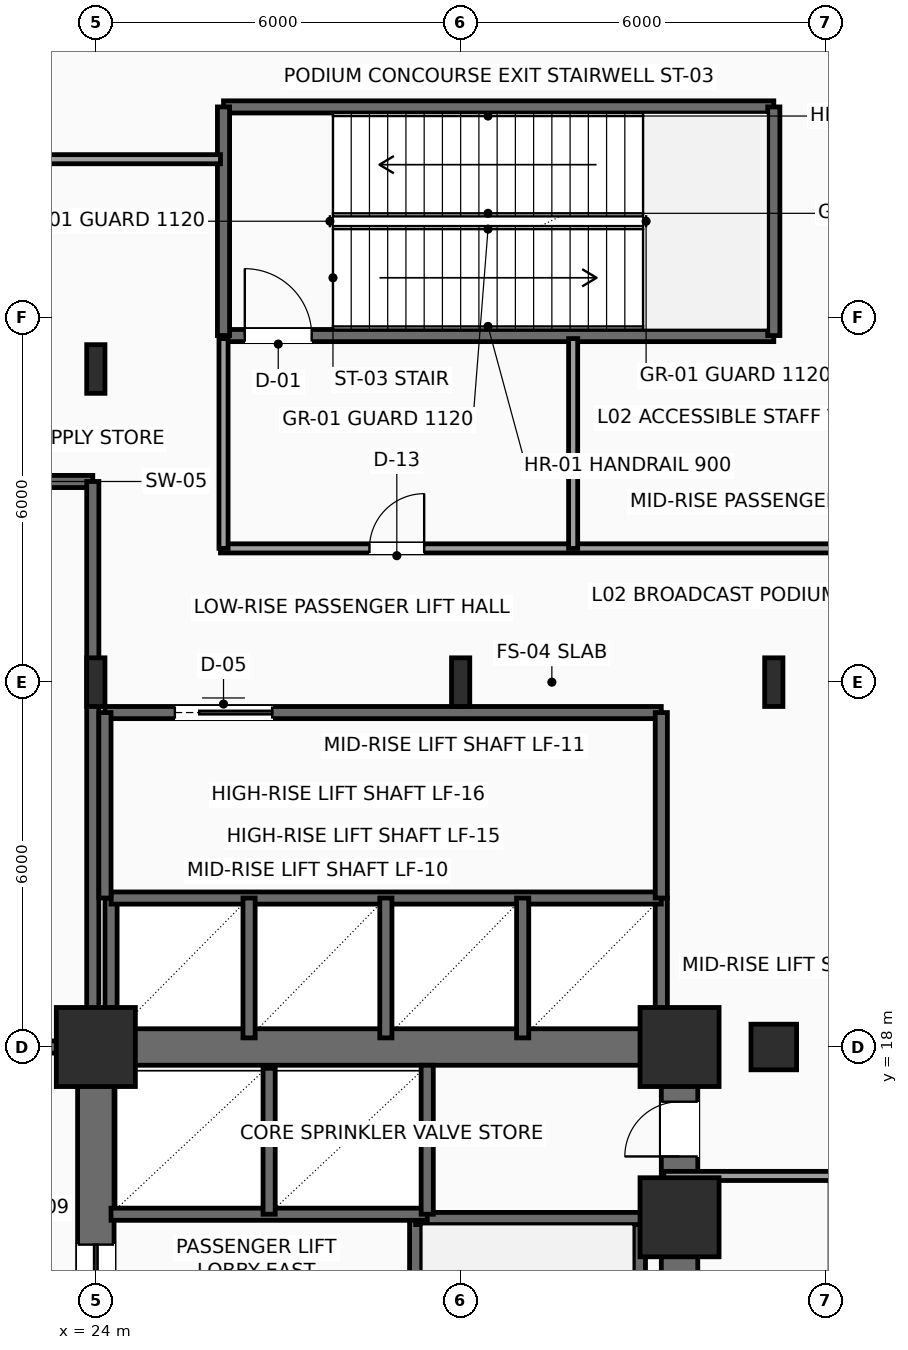
"""IFC4 building model, lengths in metres.
Left out: names, types, materials, properties, quantities, classifications, styles, units other than length and angle.
Written with IfcOpenShell. Run it as: python <this file> out.ifc"""

import sys

from ifc_helpers import new_model, si_unit, direction, frame, frame_2d, origin, origin_2d, place, context, subcontext, project, spatial, rectangle, hollow_rectangle, i_section, extrude, element, fill, save


model = new_model("IFC4")
c1 = context("Model", 3, precision=1e-05, world=origin(), true_north=direction((0.0, 1.0)))
c2 = subcontext(c1, "Body", "Model", "MODEL_VIEW")
j1 = project(units=[si_unit("LENGTHUNIT", "METRE"), si_unit("PLANEANGLEUNIT", "RADIAN")], contexts=[c1])
p1 = place(None, origin())
s1 = spatial("IfcSite", under=j1, at=p1, CompositionType="ELEMENT")
p2 = place(p1, origin())
s2 = spatial("IfcBuilding", under=s1, at=p2, CompositionType="ELEMENT")
p3 = place(p2, frame((0.0, 0.0, 11.1)))
s3 = spatial("IfcBuildingStorey", under=s2, at=p3, CompositionType="ELEMENT", Elevation=11.1)
for number, where, z_axis, x_axis in (
    (1, (24.0, 18.0, 0.0), (0.0, 0.0, 1.0), (1.0, 0.0, 0.0)),
    (2, (33.6, 15.2, 0.0), (0.0, 0.0, 1.0), (1.0, 0.0, 0.0)),
    (3, (33.6, 18.0, 0.0), (0.0, 0.0, 1.0), (1.0, 0.0, 0.0)),
):
    element("IfcColumn", number, at=place(p3, frame(where, z_axis=z_axis, x_axis=x_axis)), inside=s3, PredefinedType="COLUMN", context=c2, shape_type="SweptSolid", body=[
        extrude(rectangle(XDim=1.3, YDim=1.3, at=origin_2d()), origin(), (0.0, 0.0, 1.0), 5.4),
    ])
for number, where, z_axis, x_axis in (
    (4, (24.0, 24.0, 0.0), (0.0, 0.0, 1.0), (1.0, 0.0, 0.0)),
    (5, (24.0, 29.15, 0.0), (0.0, 0.0, 1.0), (1.0, 0.0, 0.0)),
    (6, (30.0, 24.0, 0.0), (0.0, 0.0, 1.0), (1.0, 0.0, 0.0)),
):
    element("IfcColumn", number, at=place(p3, frame(where, z_axis=z_axis, x_axis=x_axis)), inside=s3, PredefinedType="COLUMN", context=c2, shape_type="SweptSolid", body=[
        extrude(i_section(OverallWidth=0.3, OverallDepth=0.8, WebThickness=0.018, FlangeThickness=0.033, FilletRadius=0.03, at=origin_2d()), origin(), (0.0, 0.0, 1.0), 5.4),
    ])
p4 = place(p3, frame((35.15, 18.0, 0.0), z_axis=(0.0, 0.0, 1.0), x_axis=(1.0, 0.0, 0.0)))
e7 = element("IfcColumn", 7, at=p4, inside=s3, PredefinedType="COLUMN", context=c2, shape_type="SweptSolid", body=[
    extrude(hollow_rectangle(XDim=0.75, YDim=0.75, WallThickness=0.035, InnerFilletRadius=0.035, OuterFilletRadius=0.05, at=origin_2d()), origin(), (0.0, 0.0, 1.0), 5.4),
])
p5 = place(p3, frame((35.15, 24.0, 0.0), z_axis=(0.0, 0.0, 1.0), x_axis=(1.0, 0.0, 0.0)))
e8 = element("IfcColumn", 8, at=p5, inside=s3, PredefinedType="COLUMN", context=c2, shape_type="SweptSolid", body=[
    extrude(i_section(OverallWidth=0.3, OverallDepth=0.8, WebThickness=0.018, FlangeThickness=0.033, FilletRadius=0.03, at=origin_2d()), origin(), (0.0, 0.0, 1.0), 5.4),
])
p6 = place(p3, frame((24.0, 18.0, 0.0), z_axis=(0.0, 0.0, 1.0), x_axis=(1.0, 0.0, 0.0)))
e9 = element("IfcWall", 9, at=p6, inside=s3, PredefinedType="SHEAR", context=c2, shape_type="SweptSolid", body=[
    extrude(rectangle(XDim=9.6, YDim=0.6, at=frame_2d((4.8, 0.0))), origin(), (0.0, 0.0, 1.0), 5.1),
])
p7 = place(p3, frame((24.0, 6.0, 0.0), z_axis=(0.0, 0.0, 1.0), x_axis=(0.0, 1.0, 0.0)))
e10 = element("IfcWall", 10, at=p7, inside=s3, PredefinedType="SHEAR", context=c2, shape_type="SweptSolid", body=[
    extrude(rectangle(XDim=12.0, YDim=0.6, at=frame_2d((6.0, 0.0))), origin(), (0.0, 0.0, 1.0), 5.1),
])
p8 = place(p7, frame((7.15, 0.0, 0.0)))
e11 = element("IfcOpeningElement", 11, at=p8, cuts=e10, PredefinedType="OPENING", context=c2, shape_type="SweptSolid", body=[
    extrude(rectangle(XDim=1.6, YDim=2.3, at=frame_2d((0.8, 1.15))), frame((0.0, 0.31, 0.0), z_axis=(0.0, -1.0, 0.0), x_axis=(1.0, 0.0, 0.0)), (0.0, 0.0, 1.0), 0.62),
])
p9 = place(p3, frame((33.6, 6.0, 0.0), z_axis=(0.0, 0.0, 1.0), x_axis=(0.0, 1.0, 0.0)))
e12 = element("IfcWall", 12, at=p9, inside=s3, PredefinedType="SHEAR", context=c2, shape_type="SweptSolid", body=[
    extrude(rectangle(XDim=12.0, YDim=0.6, at=frame_2d((6.0, 0.0))), origin(), (0.0, 0.0, 1.0), 5.1),
])
p10 = place(p9, frame((10.2, 0.0, 0.0)))
e13 = element("IfcOpeningElement", 13, at=p10, cuts=e12, PredefinedType="OPENING", context=c2, shape_type="SweptSolid", body=[
    extrude(rectangle(XDim=0.9, YDim=2.15, at=frame_2d((0.45, 1.075))), frame((0.0, 0.31, 0.0), z_axis=(0.0, -1.0, 0.0), x_axis=(1.0, 0.0, 0.0)), (0.0, 0.0, 1.0), 0.62),
])
p11 = place(p3, frame((29.26, 6.3, 0.0), z_axis=(0.0, 0.0, 1.0), x_axis=(0.0, 1.0, 0.0)))
e14 = element("IfcWall", 14, at=p11, inside=s3, PredefinedType="SHEAR", context=c2, shape_type="SweptSolid", body=[
    extrude(rectangle(XDim=8.88, YDim=0.2, at=frame_2d((4.44, 0.0))), origin(), (0.0, 0.0, 1.0), 5.1),
])
p12 = place(p11, frame((0.35, 0.0, 0.0)))
e15 = element("IfcOpeningElement", 15, at=p12, cuts=e14, PredefinedType="OPENING", context=c2, shape_type="SweptSolid", body=[
    extrude(rectangle(XDim=1.1, YDim=2.2, at=frame_2d((0.55, 1.1))), frame((0.0, 0.11, 0.0), z_axis=(0.0, -1.0, 0.0), x_axis=(1.0, 0.0, 0.0)), (0.0, 0.0, 1.0), 0.22),
])
p13 = place(p3, frame((32.94, 6.3, 0.0), z_axis=(0.0, 0.0, 1.0), x_axis=(0.0, 1.0, 0.0)))
e16 = element("IfcWall", 16, at=p13, inside=s3, PredefinedType="SHEAR", context=c2, shape_type="SweptSolid", body=[
    extrude(rectangle(XDim=8.88, YDim=0.2, at=frame_2d((4.44, 0.0))), origin(), (0.0, 0.0, 1.0), 5.1),
])
p14 = place(p3, frame((29.26, 15.18, 0.0), z_axis=(0.0, 0.0, 1.0), x_axis=(1.0, 0.0, 0.0)))
e17 = element("IfcWall", 17, at=p14, inside=s3, PredefinedType="SHEAR", context=c2, shape_type="SweptSolid", body=[
    extrude(rectangle(XDim=4.04, YDim=0.2, at=frame_2d((2.02, 0.0))), origin(), (0.0, 0.0, 1.0), 5.1),
])
p15 = place(p3, frame((24.25, 15.25, 0.0), z_axis=(0.0, 0.0, 1.0), x_axis=(1.0, 0.0, 0.0)))
e18 = element("IfcWall", 18, at=p15, inside=s3, PredefinedType="SHEAR", context=c2, shape_type="SweptSolid", body=[
    extrude(rectangle(XDim=5.2, YDim=0.2, at=frame_2d((2.6, 0.0))), origin(), (0.0, 0.0, 1.0), 5.1),
])
p16 = place(p3, frame((26.85, 15.25, 0.0), z_axis=(0.0, 0.0, 1.0), x_axis=(0.0, 1.0, 0.0)))
e19 = element("IfcWall", 19, at=p16, inside=s3, PredefinedType="SHEAR", context=c2, shape_type="SweptSolid", body=[
    extrude(rectangle(XDim=2.4, YDim=0.2, at=frame_2d((1.2, 0.0))), origin(), (0.0, 0.0, 1.0), 5.1),
])
p17 = place(p3, frame((29.45, 15.25, 0.0), z_axis=(0.0, 0.0, 1.0), x_axis=(0.0, 1.0, 0.0)))
e20 = element("IfcWall", 20, at=p17, inside=s3, PredefinedType="SHEAR", context=c2, shape_type="SweptSolid", body=[
    extrude(rectangle(XDim=2.45, YDim=0.2, at=frame_2d((1.225, 0.0))), origin(), (0.0, 0.0, 1.0), 5.1),
])
p18 = place(p3, frame((20.45, 18.0, 0.0), z_axis=(0.0, 0.0, 1.0), x_axis=(1.0, 0.0, 0.0)))
e21 = element("IfcWall", 21, at=p18, inside=s3, PredefinedType="SHEAR", context=c2, shape_type="SweptSolid", body=[
    extrude(rectangle(XDim=3.5, YDim=0.2, at=frame_2d((1.75, 0.0))), origin(), (0.0, 0.0, 1.0), 5.1),
])
p19 = place(p18, frame((0.95, 0.0, 0.0)))
e22 = element("IfcOpeningElement", 22, at=p19, cuts=e21, PredefinedType="OPENING", context=c2, shape_type="SweptSolid", body=[
    extrude(rectangle(XDim=1.6, YDim=2.3, at=frame_2d((0.8, 1.15))), frame((0.0, 0.11, 0.0), z_axis=(0.0, -1.0, 0.0), x_axis=(1.0, 0.0, 0.0)), (0.0, 0.0, 1.0), 0.22),
])
p20 = place(p3, frame((20.45, 27.3, 0.0), z_axis=(0.0, 0.0, 1.0), x_axis=(1.0, 0.0, 0.0)))
e23 = element("IfcWall", 23, at=p20, inside=s3, PredefinedType="SHEAR", context=c2, shape_type="SweptSolid", body=[
    extrude(rectangle(XDim=3.5, YDim=0.2, at=frame_2d((1.75, 0.0))), origin(), (0.0, 0.0, 1.0), 5.1),
])
p21 = place(p3, frame((23.95, 18.0, 0.0), z_axis=(0.0, 0.0, 1.0), x_axis=(0.0, 1.0, 0.0)))
e24 = element("IfcWall", 24, at=p21, inside=s3, PredefinedType="SHEAR", context=c2, shape_type="SweptSolid", body=[
    extrude(rectangle(XDim=9.3, YDim=0.2, at=frame_2d((4.65, 0.0))), origin(), (0.0, 0.0, 1.0), 5.1),
])
for number, where, z_axis, x_axis in (
    (25, (33.3, 18.1, 0.0), (0.0, 0.0, 1.0), (0.0, 1.0, 0.0)),
    (26, (24.25, 18.1, 0.0), (0.0, 0.0, 1.0), (0.0, 1.0, 0.0)),
):
    element("IfcWall", number, at=place(p3, frame(where, z_axis=z_axis, x_axis=x_axis)), inside=s3, PredefinedType="SHEAR", context=c2, shape_type="SweptSolid", body=[
        extrude(rectangle(XDim=2.35, YDim=0.2, at=frame_2d((1.175, 0.0))), origin(), (0.0, 0.0, 1.0), 5.1),
    ])
p22 = place(p3, frame((24.25, 20.45, 0.0), z_axis=(0.0, 0.0, 1.0), x_axis=(1.0, 0.0, 0.0)))
e27 = element("IfcWall", 27, at=p22, inside=s3, PredefinedType="SHEAR", context=c2, shape_type="SweptSolid", body=[
    extrude(rectangle(XDim=9.05, YDim=0.2, at=frame_2d((4.525, 0.0))), origin(), (0.0, 0.0, 1.0), 5.1),
])
for number, where, z_axis, x_axis in (
    (28, (26.52, 18.15, 0.0), (0.0, 0.0, 1.0), (0.0, 1.0, 0.0)),
    (29, (28.77, 18.15, 0.0), (0.0, 0.0, 1.0), (0.0, 1.0, 0.0)),
    (30, (31.02, 18.15, 0.0), (0.0, 0.0, 1.0), (0.0, 1.0, 0.0)),
):
    element("IfcWall", number, at=place(p3, frame(where, z_axis=z_axis, x_axis=x_axis)), inside=s3, PredefinedType="SHEAR", context=c2, shape_type="SweptSolid", body=[
        extrude(rectangle(XDim=2.3, YDim=0.2, at=frame_2d((1.15, 0.0))), origin(), (0.0, 0.0, 1.0), 5.1),
    ])
p23 = place(p3, frame((24.15, 23.5, 0.0), z_axis=(0.0, 0.0, 1.0), x_axis=(1.0, 0.0, 0.0)))
e31 = element("IfcWall", 31, at=p23, inside=s3, PredefinedType="SHEAR", context=c2, shape_type="SweptSolid", body=[
    extrude(rectangle(XDim=9.15, YDim=0.2, at=frame_2d((4.575, 0.0))), origin(), (0.0, 0.0, 1.0), 5.1),
])
p24 = place(p23, frame((1.15, 0.0, 0.0)))
e32 = element("IfcOpeningElement", 32, at=p24, cuts=e31, PredefinedType="OPENING", context=c2, shape_type="SweptSolid", body=[
    extrude(rectangle(XDim=1.6, YDim=2.3, at=frame_2d((0.8, 1.15))), frame((0.0, 0.11, 0.0), z_axis=(0.0, -1.0, 0.0), x_axis=(1.0, 0.0, 0.0)), (0.0, 0.0, 1.0), 0.22),
])
for number, where, z_axis, x_axis in (
    (33, (33.3, 20.45, 0.0), (0.0, 0.0, 1.0), (0.0, 1.0, 0.0)),
    (34, (24.15, 20.45, 0.0), (0.0, 0.0, 1.0), (0.0, 1.0, 0.0)),
):
    element("IfcWall", number, at=place(p3, frame(where, z_axis=z_axis, x_axis=x_axis)), inside=s3, PredefinedType="SHEAR", context=c2, shape_type="SweptSolid", body=[
        extrude(rectangle(XDim=3.05, YDim=0.2, at=frame_2d((1.525, 0.0))), origin(), (0.0, 0.0, 1.0), 5.1),
    ])
p25 = place(p3, frame((26.1, 29.7, 0.0), z_axis=(0.0, 0.0, 1.0), x_axis=(1.0, 0.0, 0.0)))
e35 = element("IfcWall", 35, at=p25, inside=s3, PredefinedType="SHEAR", context=c2, shape_type="SweptSolid", body=[
    extrude(rectangle(XDim=9.05, YDim=0.2, at=frame_2d((4.525, 0.0))), origin(), (0.0, 0.0, 1.0), 5.1),
])
p26 = place(p25, frame((0.35, 0.0, 0.0)))
e36 = element("IfcOpeningElement", 36, at=p26, cuts=e35, PredefinedType="OPENING", context=c2, shape_type="SweptSolid", body=[
    extrude(rectangle(XDim=1.1, YDim=2.2, at=frame_2d((0.55, 1.1))), frame((0.0, 0.11, 0.0), z_axis=(0.0, -1.0, 0.0), x_axis=(1.0, 0.0, 0.0)), (0.0, 0.0, 1.0), 0.22),
])
p27 = place(p3, frame((26.1, 33.46, 0.0), z_axis=(0.0, 0.0, 1.0), x_axis=(1.0, 0.0, 0.0)))
e37 = element("IfcWall", 37, at=p27, inside=s3, PredefinedType="SHEAR", context=c2, shape_type="SweptSolid", body=[
    extrude(rectangle(XDim=9.05, YDim=0.2, at=frame_2d((4.525, 0.0))), origin(), (0.0, 0.0, 1.0), 5.1),
])
for number, where, z_axis, x_axis in (
    (38, (26.1, 29.7, 0.0), (0.0, 0.0, 1.0), (0.0, 1.0, 0.0)),
    (39, (35.15, 29.7, 0.0), (0.0, 0.0, 1.0), (0.0, 1.0, 0.0)),
):
    element("IfcWall", number, at=place(p3, frame(where, z_axis=z_axis, x_axis=x_axis)), inside=s3, PredefinedType="SHEAR", context=c2, shape_type="SweptSolid", body=[
        extrude(rectangle(XDim=3.76, YDim=0.2, at=frame_2d((1.88, 0.0))), origin(), (0.0, 0.0, 1.0), 5.1),
    ])
p28 = place(p3, frame((36.15, 15.88, 0.0), z_axis=(0.0, 0.0, 1.0), x_axis=(-1.0, 0.0, 0.0)))
e40 = element("IfcWall", 40, at=p28, inside=s3, PredefinedType="PARTITIONING", context=c2, shape_type="SweptSolid", body=[
    extrude(rectangle(XDim=2.81, YDim=0.15, at=frame_2d((1.405, 0.0))), origin(), (0.0, 0.0, 1.0), 5.1),
])
p29 = place(p3, frame((20.5, 32.6, 0.0), z_axis=(0.0, 0.0, 1.0), x_axis=(1.0, 0.0, 0.0)))
e41 = element("IfcWall", 41, at=p29, inside=s3, PredefinedType="PARTITIONING", context=c2, shape_type="SweptSolid", body=[
    extrude(rectangle(XDim=5.55, YDim=0.15, at=frame_2d((2.775, 0.0))), origin(), (0.0, 0.0, 1.0), 5.1),
])
p30 = place(p3, frame((26.05, 26.2, 0.0), z_axis=(0.0, 0.0, 1.0), x_axis=(1.0, 0.0, 0.0)))
e42 = element("IfcWall", 42, at=p30, inside=s3, PredefinedType="PARTITIONING", context=c2, shape_type="SweptSolid", body=[
    extrude(rectangle(XDim=33.55, YDim=0.15, at=frame_2d((16.775, 0.0))), origin(), (0.0, 0.0, 1.0), 5.1),
])
p31 = place(p30, frame((2.45, 0.0, 0.0)))
e43 = element("IfcOpeningElement", 43, at=p31, cuts=e42, PredefinedType="OPENING", context=c2, shape_type="SweptSolid", body=[
    extrude(rectangle(XDim=0.9, YDim=2.1, at=frame_2d((0.45, 1.05))), frame((0.0, 0.085, 0.0), z_axis=(0.0, -1.0, 0.0), x_axis=(1.0, 0.0, 0.0)), (0.0, 0.0, 1.0), 0.17),
])
p32 = place(p30, frame((12.1, 0.0, 0.0)))
e44 = element("IfcOpeningElement", 44, at=p32, cuts=e42, PredefinedType="OPENING", context=c2, shape_type="SweptSolid", body=[
    extrude(rectangle(XDim=0.95, YDim=2.15, at=frame_2d((0.475, 1.075))), frame((0.0, 0.085, 0.0), z_axis=(0.0, -1.0, 0.0), x_axis=(1.0, 0.0, 0.0)), (0.0, 0.0, 1.0), 0.17),
])
p33 = place(p30, frame((19.575, 0.0, 0.0)))
e45 = element("IfcOpeningElement", 45, at=p33, cuts=e42, PredefinedType="OPENING", context=c2, shape_type="SweptSolid", body=[
    extrude(rectangle(XDim=0.95, YDim=2.15, at=frame_2d((0.475, 1.075))), frame((0.0, 0.085, 0.0), z_axis=(0.0, -1.0, 0.0), x_axis=(1.0, 0.0, 0.0)), (0.0, 0.0, 1.0), 0.17),
])
p34 = place(p30, frame((26.475, 0.0, 0.0)))
e46 = element("IfcOpeningElement", 46, at=p34, cuts=e42, PredefinedType="OPENING", context=c2, shape_type="SweptSolid", body=[
    extrude(rectangle(XDim=0.95, YDim=2.15, at=frame_2d((0.475, 1.075))), frame((0.0, 0.085, 0.0), z_axis=(0.0, -1.0, 0.0), x_axis=(1.0, 0.0, 0.0)), (0.0, 0.0, 1.0), 0.17),
])
p35 = place(p30, frame((31.175, 0.0, 0.0)))
e47 = element("IfcOpeningElement", 47, at=p35, cuts=e42, PredefinedType="OPENING", context=c2, shape_type="SweptSolid", body=[
    extrude(rectangle(XDim=0.95, YDim=2.15, at=frame_2d((0.475, 1.075))), frame((0.0, 0.085, 0.0), z_axis=(0.0, -1.0, 0.0), x_axis=(1.0, 0.0, 0.0)), (0.0, 0.0, 1.0), 0.17),
])
for number, where, z_axis, x_axis in (
    (48, (26.1, 26.2, 0.0), (0.0, 0.0, 1.0), (0.0, 1.0, 0.0)),
    (49, (31.85, 26.2, 0.0), (0.0, 0.0, 1.0), (0.0, 1.0, 0.0)),
):
    element("IfcWall", number, at=place(p3, frame(where, z_axis=z_axis, x_axis=x_axis)), inside=s3, PredefinedType="PARTITIONING", context=c2, shape_type="SweptSolid", body=[
        extrude(rectangle(XDim=3.45, YDim=0.15, at=frame_2d((1.725, 0.0))), origin(), (0.0, 0.0, 1.0), 5.1),
    ])
p36 = place(p8, origin())
e50 = element("IfcDoor", 50, at=p36, inside=s3, OperationType="DOUBLE_DOOR_SLIDING", PredefinedType="DOOR", context=c2, shape_type="SweptSolid", body=[
    extrude(rectangle(XDim=1.6, YDim=2.3, at=frame_2d((0.8, 1.15))), frame((0.0, 0.025, 0.0), z_axis=(0.0, -1.0, 0.0), x_axis=(1.0, 0.0, 0.0)), (0.0, 0.0, 1.0), 0.05),
])
fill(e11, e50)
p37 = place(p10, origin())
e51 = element("IfcDoor", 51, at=p37, inside=s3, OperationType="SINGLE_SWING_LEFT", PredefinedType="DOOR", context=c2, shape_type="SweptSolid", body=[
    extrude(rectangle(XDim=0.9, YDim=2.15, at=frame_2d((0.45, 1.075))), frame((0.0, 0.025, 0.0), z_axis=(0.0, -1.0, 0.0), x_axis=(1.0, 0.0, 0.0)), (0.0, 0.0, 1.0), 0.05),
])
fill(e13, e51)
p38 = place(p24, origin())
e52 = element("IfcDoor", 52, at=p38, inside=s3, OperationType="DOUBLE_DOOR_SLIDING", PredefinedType="DOOR", context=c2, shape_type="SweptSolid", body=[
    extrude(rectangle(XDim=1.6, YDim=2.3, at=frame_2d((0.8, 1.15))), frame((0.0, 0.025, 0.0), z_axis=(0.0, -1.0, 0.0), x_axis=(1.0, 0.0, 0.0)), (0.0, 0.0, 1.0), 0.05),
])
fill(e32, e52)
p39 = place(p26, origin())
e53 = element("IfcDoor", 53, at=p39, inside=s3, OperationType="SINGLE_SWING_LEFT", PredefinedType="DOOR", context=c2, shape_type="SweptSolid", body=[
    extrude(rectangle(XDim=1.1, YDim=2.2, at=frame_2d((0.55, 1.1))), frame((0.0, 0.025, 0.0), z_axis=(0.0, -1.0, 0.0), x_axis=(1.0, 0.0, 0.0)), (0.0, 0.0, 1.0), 0.05),
])
fill(e36, e53)
p40 = place(p31, origin())
e54 = element("IfcDoor", 54, at=p40, inside=s3, OperationType="SINGLE_SWING_RIGHT", PredefinedType="DOOR", context=c2, shape_type="SweptSolid", body=[
    extrude(rectangle(XDim=0.9, YDim=2.1, at=frame_2d((0.45, 1.05))), frame((0.0, 0.025, 0.0), z_axis=(0.0, -1.0, 0.0), x_axis=(1.0, 0.0, 0.0)), (0.0, 0.0, 1.0), 0.05),
])
fill(e43, e54)
save(model, sys.argv[1])
